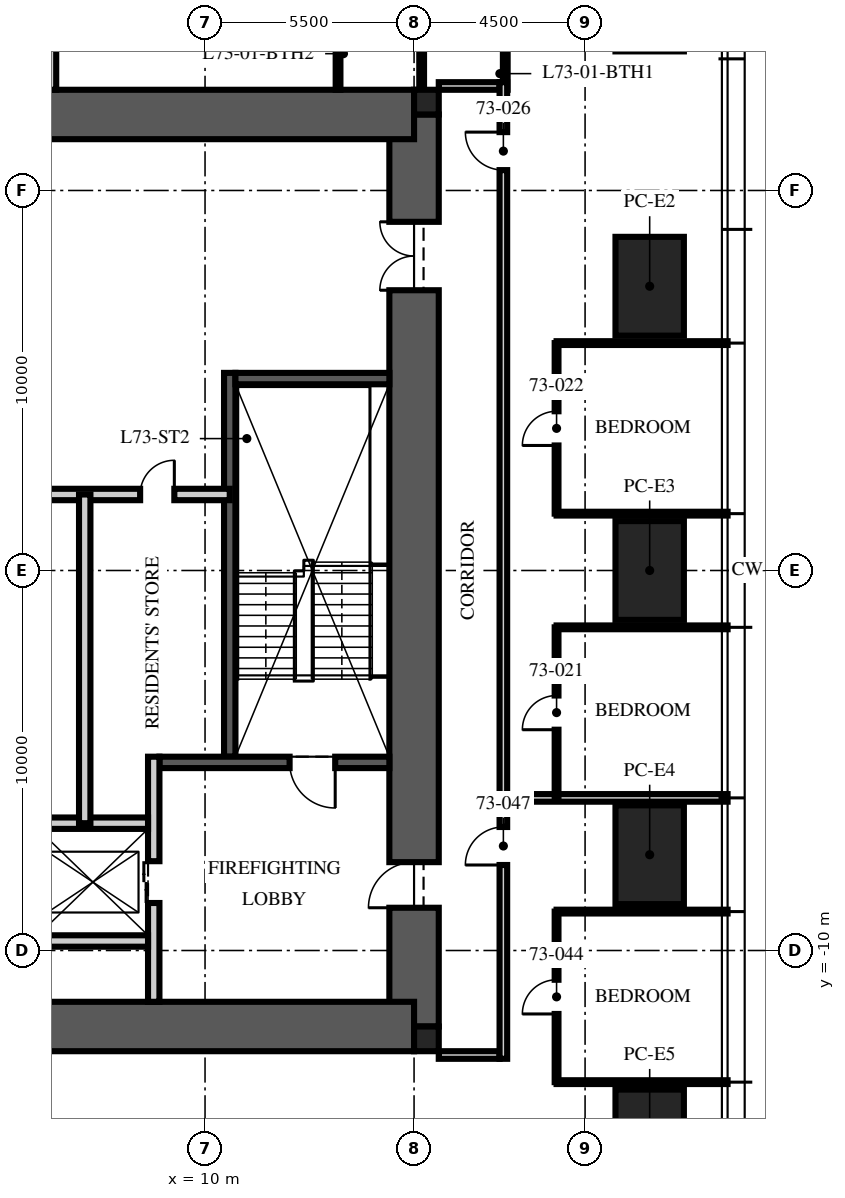
"""IFC4 building model, lengths in metres.
Left out: names, types, materials, properties, quantities, classifications, styles, units other than length and angle.
Written with IfcOpenShell. Run it as: python <this file> out.ifc"""

import sys

from ifc_helpers import new_model, si_unit, direction, frame, frame_2d, origin, origin_2d, place, context, subcontext, project, spatial, rectangle, extrude, element, fill, save


model = new_model("IFC4")
c1 = context("Model", 3, precision=1e-05, world=origin(), true_north=direction((0.0, 1.0)))
c2 = subcontext(c1, "Body", "Model", "MODEL_VIEW")
j1 = project(units=[si_unit("LENGTHUNIT", "METRE"), si_unit("PLANEANGLEUNIT", "RADIAN")], contexts=[c1])
p1 = place(None, origin())
s1 = spatial("IfcSite", under=j1, at=p1, CompositionType="ELEMENT")
p2 = place(p1, origin())
s2 = spatial("IfcBuilding", under=s1, at=p2, CompositionType="ELEMENT")
p3 = place(p2, frame((0.0, 0.0, 293.25)))
s3 = spatial("IfcBuildingStorey", under=s2, at=p3, CompositionType="ELEMENT", Elevation=293.25)
p4 = place(p3, frame((15.5, -12.0, -0.25), z_axis=(0.0, 0.0, 1.0), x_axis=(0.0, 1.0, 0.0)))
e1 = element("IfcWall", 1, at=p4, inside=s3, PredefinedType="SHEAR", context=c2, shape_type="SweptSolid", body=[
    extrude(rectangle(XDim=24.0, YDim=1.3, at=frame_2d((12.0, 0.0))), origin(), (0.0, 0.0, 1.0), 3.75),
])
p5 = place(p4, frame((3.125, 0.0, 0.25)))
e2 = element("IfcOpeningElement", 2, at=p5, cuts=e1, PredefinedType="OPENING", context=c2, shape_type="SweptSolid", body=[
    extrude(rectangle(XDim=1.2, YDim=2.1, at=frame_2d((0.6, 1.05))), frame((0.0, 0.66, 0.0), z_axis=(0.0, -1.0, 0.0), x_axis=(1.0, 0.0, 0.0)), (0.0, 0.0, 1.0), 1.32),
])
p6 = place(p4, frame((19.375, 0.0, 0.25)))
e3 = element("IfcOpeningElement", 3, at=p6, cuts=e1, PredefinedType="OPENING", context=c2, shape_type="SweptSolid", body=[
    extrude(rectangle(XDim=1.8, YDim=2.1, at=frame_2d((0.9, 1.05))), frame((0.0, 0.66, 0.0), z_axis=(0.0, -1.0, 0.0), x_axis=(1.0, 0.0, 0.0)), (0.0, 0.0, 1.0), 1.32),
])
for number, where, z_axis, x_axis in (
    (4, (-15.5, 12.0, -0.25), (0.0, 0.0, 1.0), (1.0, 0.0, 0.0)),
    (5, (-15.5, -12.0, -0.25), (0.0, 0.0, 1.0), (1.0, 0.0, 0.0)),
):
    element("IfcWall", number, at=place(p3, frame(where, z_axis=z_axis, x_axis=x_axis)), inside=s3, PredefinedType="SHEAR", context=c2, shape_type="SweptSolid", body=[
        extrude(rectangle(XDim=31.0, YDim=1.3, at=frame_2d((15.5, 0.0))), origin(), (0.0, 0.0, 1.0), 3.75),
    ])
for number, where, z_axis, x_axis in (
    (6, (15.825, 12.325, -0.25), (0.0, 0.0, 1.0), (1.0, 0.0, 0.0)),
    (7, (15.825, -12.325, -0.25), (0.0, 0.0, 1.0), (1.0, 0.0, 0.0)),
):
    element("IfcColumn", number, at=place(p3, frame(where, z_axis=z_axis, x_axis=x_axis)), inside=s3, PredefinedType="COLUMN", context=c2, shape_type="SweptSolid", body=[
        extrude(rectangle(XDim=0.65, YDim=0.65, at=origin_2d()), origin(), (0.0, 0.0, 1.0), 3.75),
    ])
for number, where, z_axis, x_axis in (
    (8, (21.7, 7.48, 0.0), (0.0, 0.0, 1.0), (0.0, 1.0, 0.0)),
    (9, (21.7, 0.0, 0.0), (0.0, 0.0, 1.0), (0.0, 1.0, 0.0)),
    (10, (21.7, -7.48, 0.0), (0.0, 0.0, 1.0), (0.0, 1.0, 0.0)),
    (11, (21.7, -14.96, 0.0), (0.0, 0.0, 1.0), (0.0, 1.0, 0.0)),
):
    element("IfcColumn", number, at=place(p3, frame(where, z_axis=z_axis, x_axis=x_axis)), inside=s3, PredefinedType="COLUMN", context=c2, shape_type="SweptSolid", body=[
        extrude(rectangle(XDim=2.6, YDim=1.8, at=origin_2d()), origin(), (0.0, 0.0, 1.0), 3.75),
    ])
p7 = place(p3, frame((10.65, -4.9, 0.0), z_axis=(0.0, 0.0, 1.0), x_axis=(0.0, 1.0, 0.0)))
e12 = element("IfcWall", 12, at=p7, inside=s3, PredefinedType="SOLIDWALL", context=c2, shape_type="SweptSolid", body=[
    extrude(rectangle(XDim=10.1, YDim=0.3, at=frame_2d((5.05, 0.0))), origin(), (0.0, 0.0, 1.0), 3.5),
])
p8 = place(p3, frame((14.85, -5.05, 0.0), z_axis=(0.0, 0.0, 1.0), x_axis=(-1.0, 0.0, 0.0)))
e13 = element("IfcWall", 13, at=p8, inside=s3, PredefinedType="SOLIDWALL", context=c2, shape_type="SweptSolid", body=[
    extrude(rectangle(XDim=6.05, YDim=0.3, at=frame_2d((3.025, 0.0))), origin(), (0.0, 0.0, 1.0), 3.5),
])
p9 = place(p8, frame((1.425, 0.0, 0.0)))
e14 = element("IfcOpeningElement", 14, at=p9, cuts=e13, PredefinedType="OPENING", context=c2, shape_type="SweptSolid", body=[
    extrude(rectangle(XDim=1.2, YDim=2.1, at=frame_2d((0.6, 1.05))), frame((0.0, 0.16, 0.0), z_axis=(0.0, -1.0, 0.0), x_axis=(1.0, 0.0, 0.0)), (0.0, 0.0, 1.0), 0.32),
])
p10 = place(p3, frame((14.85, 5.05, 0.0), z_axis=(0.0, 0.0, 1.0), x_axis=(-1.0, 0.0, 0.0)))
e15 = element("IfcWall", 15, at=p10, inside=s3, PredefinedType="SOLIDWALL", context=c2, shape_type="SweptSolid", body=[
    extrude(rectangle(XDim=4.05, YDim=0.3, at=frame_2d((2.025, 0.0))), origin(), (0.0, 0.0, 1.0), 3.5),
])
p11 = place(p3, frame((8.65, -11.35, 0.0), z_axis=(0.0, 0.0, 1.0), x_axis=(0.0, 1.0, 0.0)))
e16 = element("IfcWall", 16, at=p11, inside=s3, PredefinedType="PARTITIONING", context=c2, shape_type="SweptSolid", body=[
    extrude(rectangle(XDim=6.45, YDim=0.3, at=frame_2d((3.225, 0.0))), origin(), (0.0, 0.0, 1.0), 3.5),
])
p12 = place(p11, frame((2.6, 0.0, 0.0)))
e17 = element("IfcOpeningElement", 17, at=p12, cuts=e16, PredefinedType="OPENING", context=c2, shape_type="SweptSolid", body=[
    extrude(rectangle(XDim=1.1, YDim=2.1, at=frame_2d((0.55, 1.05))), frame((0.0, 0.16, 0.0), z_axis=(0.0, -1.0, 0.0), x_axis=(1.0, 0.0, 0.0)), (0.0, 0.0, 1.0), 0.32),
])
p13 = place(p3, frame((-8.5, -6.65, 0.0), z_axis=(0.0, 0.0, 1.0), x_axis=(1.0, 0.0, 0.0)))
e18 = element("IfcWall", 18, at=p13, inside=s3, PredefinedType="PARTITIONING", context=c2, shape_type="SweptSolid", body=[
    extrude(rectangle(XDim=17.0, YDim=0.3, at=frame_2d((8.5, 0.0))), origin(), (0.0, 0.0, 1.0), 3.5),
])
p14 = place(p13, frame((7.8, 0.0, 0.0)))
e19 = element("IfcOpeningElement", 19, at=p14, cuts=e18, PredefinedType="OPENING", context=c2, shape_type="SweptSolid", body=[
    extrude(rectangle(XDim=1.3, YDim=2.4, at=frame_2d((0.65, 1.2))), frame((0.0, 0.16, 0.0), z_axis=(0.0, -1.0, 0.0), x_axis=(1.0, 0.0, 0.0)), (0.0, 0.0, 1.0), 0.32),
])
p15 = place(p13, frame((5.65, 0.0, 0.0)))
e20 = element("IfcOpeningElement", 20, at=p15, cuts=e18, PredefinedType="OPENING", context=c2, shape_type="SweptSolid", body=[
    extrude(rectangle(XDim=0.9, YDim=2.1, at=frame_2d((0.45, 1.05))), frame((0.0, 0.16, 0.0), z_axis=(0.0, -1.0, 0.0), x_axis=(1.0, 0.0, 0.0)), (0.0, 0.0, 1.0), 0.32),
])
p16 = place(p13, frame((10.4, 0.0, 0.0)))
e21 = element("IfcOpeningElement", 21, at=p16, cuts=e18, PredefinedType="OPENING", context=c2, shape_type="SweptSolid", body=[
    extrude(rectangle(XDim=0.9, YDim=2.1, at=frame_2d((0.45, 1.05))), frame((0.0, 0.16, 0.0), z_axis=(0.0, -1.0, 0.0), x_axis=(1.0, 0.0, 0.0)), (0.0, 0.0, 1.0), 0.32),
])
p17 = place(p3, frame((5.6, -9.75, 0.0), z_axis=(0.0, 0.0, 1.0), x_axis=(1.0, 0.0, 0.0)))
e22 = element("IfcWall", 22, at=p17, inside=s3, PredefinedType="PARTITIONING", context=c2, shape_type="SweptSolid", body=[
    extrude(rectangle(XDim=2.9, YDim=0.3, at=frame_2d((1.45, 0.0))), origin(), (0.0, 0.0, 1.0), 3.5),
])
p18 = place(p3, frame((-10.65, 2.0, 0.0), z_axis=(0.0, 0.0, 1.0), x_axis=(1.0, 0.0, 0.0)))
e23 = element("IfcWall", 23, at=p18, inside=s3, PredefinedType="PARTITIONING", context=c2, shape_type="SweptSolid", body=[
    extrude(rectangle(XDim=21.3, YDim=0.3, at=frame_2d((10.65, 0.0))), origin(), (0.0, 0.0, 1.0), 3.5),
])
p19 = place(p18, frame((10.05, 0.0, 0.0)))
e24 = element("IfcOpeningElement", 24, at=p19, cuts=e23, PredefinedType="OPENING", context=c2, shape_type="SweptSolid", body=[
    extrude(rectangle(XDim=1.2, YDim=2.1, at=frame_2d((0.6, 1.05))), frame((0.0, 0.16, 0.0), z_axis=(0.0, -1.0, 0.0), x_axis=(1.0, 0.0, 0.0)), (0.0, 0.0, 1.0), 0.32),
])
p20 = place(p18, frame((18.942, 0.0, 0.0)))
e25 = element("IfcOpeningElement", 25, at=p20, cuts=e23, PredefinedType="OPENING", context=c2, shape_type="SweptSolid", body=[
    extrude(rectangle(XDim=0.9, YDim=2.1, at=frame_2d((0.45, 1.05))), frame((0.0, 0.16, 0.0), z_axis=(0.0, -1.0, 0.0), x_axis=(1.0, 0.0, 0.0)), (0.0, 0.0, 1.0), 0.32),
])
p21 = place(p3, frame((6.834, -6.65, 0.0), z_axis=(0.0, 0.0, 1.0), x_axis=(0.0, 1.0, 0.0)))
e26 = element("IfcWall", 26, at=p21, inside=s3, PredefinedType="PARTITIONING", context=c2, shape_type="SweptSolid", body=[
    extrude(rectangle(XDim=8.65, YDim=0.3, at=frame_2d((4.325, 0.0))), origin(), (0.0, 0.0, 1.0), 3.5),
])
for number, where, z_axis, x_axis in (
    (27, (16.15, 12.75, 0.0), (0.0, 0.0, 1.0), (1.0, 0.0, 0.0)),
    (28, (16.15, -12.75, 0.0), (0.0, 0.0, 1.0), (1.0, 0.0, 0.0)),
):
    element("IfcWall", number, at=place(p3, frame(where, z_axis=z_axis, x_axis=x_axis)), inside=s3, PredefinedType="PARTITIONING", context=c2, shape_type="SweptSolid", body=[
        extrude(rectangle(XDim=1.6, YDim=0.2, at=frame_2d((0.8, 0.0))), origin(), (0.0, 0.0, 1.0), 2.6),
    ])
p22 = place(p3, frame((17.95, -5.984, 0.0), z_axis=(0.0, 0.0, 1.0), x_axis=(1.0, 0.0, 0.0)))
e29 = element("IfcWall", 29, at=p22, inside=s3, PredefinedType="PARTITIONING", context=c2, shape_type="SweptSolid", body=[
    extrude(rectangle(XDim=5.8, YDim=0.2, at=frame_2d((2.9, 0.0))), origin(), (0.0, 0.0, 1.0), 3.01),
])
for number, where, z_axis, x_axis in (
    (30, (19.25, -1.496, 0.0), (0.0, 0.0, 1.0), (1.0, 0.0, 0.0)),
    (31, (19.25, 1.496, 0.0), (0.0, 0.0, 1.0), (1.0, 0.0, 0.0)),
    (32, (19.25, 5.984, 0.0), (0.0, 0.0, 1.0), (1.0, 0.0, 0.0)),
):
    element("IfcWall", number, at=place(p3, frame(where, z_axis=z_axis, x_axis=x_axis)), inside=s3, PredefinedType="PARTITIONING", context=c2, shape_type="SweptSolid", body=[
        extrude(rectangle(XDim=4.5, YDim=0.1, at=frame_2d((2.25, 0.0))), origin(), (0.0, 0.0, 1.0), 3.01),
    ])
p23 = place(p3, frame((5.984, 12.65, 0.0), z_axis=(0.0, 0.0, 1.0), x_axis=(0.0, 1.0, 0.0)))
e33 = element("IfcWall", 33, at=p23, inside=s3, PredefinedType="PARTITIONING", context=c2, shape_type="SweptSolid", body=[
    extrude(rectangle(XDim=11.1, YDim=0.2, at=frame_2d((5.55, 0.0))), origin(), (0.0, 0.0, 1.0), 3.01),
])
for number, where, z_axis, x_axis in (
    (34, (19.25, -13.464, 0.0), (0.0, 0.0, 1.0), (1.0, 0.0, 0.0)),
    (35, (19.25, -8.976, 0.0), (0.0, 0.0, 1.0), (1.0, 0.0, 0.0)),
):
    element("IfcWall", number, at=place(p3, frame(where, z_axis=z_axis, x_axis=x_axis)), inside=s3, PredefinedType="PARTITIONING", context=c2, shape_type="SweptSolid", body=[
        extrude(rectangle(XDim=4.5, YDim=0.1, at=frame_2d((2.25, 0.0))), origin(), (0.0, 0.0, 1.0), 3.01),
    ])
p24 = place(p3, frame((19.25, -5.984, 0.0), z_axis=(0.0, 0.0, 1.0), x_axis=(0.0, 1.0, 0.0)))
e36 = element("IfcWall", 36, at=p24, inside=s3, PredefinedType="PARTITIONING", context=c2, shape_type="SweptSolid", body=[
    extrude(rectangle(XDim=4.488, YDim=0.1, at=frame_2d((2.244, 0.0))), origin(), (0.0, 0.0, 1.0), 2.91),
])
p25 = place(p24, frame((1.794, 0.0, 0.0)))
e37 = element("IfcOpeningElement", 37, at=p25, cuts=e36, PredefinedType="OPENING", context=c2, shape_type="SweptSolid", body=[
    extrude(rectangle(XDim=0.9, YDim=2.1, at=frame_2d((0.45, 1.05))), frame((0.0, 0.06, 0.0), z_axis=(0.0, -1.0, 0.0), x_axis=(1.0, 0.0, 0.0)), (0.0, 0.0, 1.0), 0.12),
])
p26 = place(p3, frame((19.25, 1.496, 0.0), z_axis=(0.0, 0.0, 1.0), x_axis=(0.0, 1.0, 0.0)))
e38 = element("IfcWall", 38, at=p26, inside=s3, PredefinedType="PARTITIONING", context=c2, shape_type="SweptSolid", body=[
    extrude(rectangle(XDim=4.488, YDim=0.1, at=frame_2d((2.244, 0.0))), origin(), (0.0, 0.0, 1.0), 2.91),
])
p27 = place(p26, frame((1.794, 0.0, 0.0)))
e39 = element("IfcOpeningElement", 39, at=p27, cuts=e38, PredefinedType="OPENING", context=c2, shape_type="SweptSolid", body=[
    extrude(rectangle(XDim=0.9, YDim=2.1, at=frame_2d((0.45, 1.05))), frame((0.0, 0.06, 0.0), z_axis=(0.0, -1.0, 0.0), x_axis=(1.0, 0.0, 0.0)), (0.0, 0.0, 1.0), 0.12),
])
p28 = place(p3, frame((17.9, 12.65, 0.0), z_axis=(0.0, 0.0, 1.0), x_axis=(0.0, 1.0, 0.0)))
e40 = element("IfcWall", 40, at=p28, inside=s3, PredefinedType="PARTITIONING", context=c2, shape_type="SweptSolid", body=[
    extrude(rectangle(XDim=2.8, YDim=0.125, at=frame_2d((1.4, 0.0))), origin(), (0.0, 0.0, 1.0), 2.9),
])
p29 = place(p3, frame((15.7, 12.65, 0.0), z_axis=(0.0, 0.0, 1.0), x_axis=(0.0, 1.0, 0.0)))
e41 = element("IfcWall", 41, at=p29, inside=s3, PredefinedType="PARTITIONING", context=c2, shape_type="SweptSolid", body=[
    extrude(rectangle(XDim=2.8, YDim=0.125, at=frame_2d((1.4, 0.0))), origin(), (0.0, 0.0, 1.0), 2.6),
])
p30 = place(p3, frame((13.5, 12.65, 0.0), z_axis=(0.0, 0.0, 1.0), x_axis=(0.0, 1.0, 0.0)))
e42 = element("IfcWall", 42, at=p30, inside=s3, PredefinedType="PARTITIONING", context=c2, shape_type="SweptSolid", body=[
    extrude(rectangle(XDim=2.8, YDim=0.125, at=frame_2d((1.4, 0.0))), origin(), (0.0, 0.0, 1.0), 3.5),
])
p31 = place(p3, frame((19.25, -13.464, 0.0), z_axis=(0.0, 0.0, 1.0), x_axis=(0.0, 1.0, 0.0)))
e43 = element("IfcWall", 43, at=p31, inside=s3, PredefinedType="PARTITIONING", context=c2, shape_type="SweptSolid", body=[
    extrude(rectangle(XDim=4.488, YDim=0.1, at=frame_2d((2.244, 0.0))), origin(), (0.0, 0.0, 1.0), 2.91),
])
p32 = place(p31, frame((1.794, 0.0, 0.0)))
e44 = element("IfcOpeningElement", 44, at=p32, cuts=e43, PredefinedType="OPENING", context=c2, shape_type="SweptSolid", body=[
    extrude(rectangle(XDim=0.9, YDim=2.1, at=frame_2d((0.45, 1.05))), frame((0.0, 0.06, 0.0), z_axis=(0.0, -1.0, 0.0), x_axis=(1.0, 0.0, 0.0)), (0.0, 0.0, 1.0), 0.12),
])
p33 = place(p3, frame((17.85, -12.85, 0.0), z_axis=(0.0, 0.0, 1.0), x_axis=(0.0, 1.0, 0.0)))
e45 = element("IfcWall", 45, at=p33, inside=s3, PredefinedType="PARTITIONING", context=c2, shape_type="SweptSolid", body=[
    extrude(rectangle(XDim=25.7, YDim=0.2, at=frame_2d((12.85, 0.0))), origin(), (0.0, 0.0, 1.0), 2.9),
])
p34 = place(p33, frame((23.386, 0.0, 0.0)))
e46 = element("IfcOpeningElement", 46, at=p34, cuts=e45, PredefinedType="OPENING", context=c2, shape_type="SweptSolid", body=[
    extrude(rectangle(XDim=1.0, YDim=2.2, at=frame_2d((0.5, 1.1))), frame((0.0, 0.11, 0.0), z_axis=(0.0, -1.0, 0.0), x_axis=(1.0, 0.0, 0.0)), (0.0, 0.0, 1.0), 0.22),
])
p35 = place(p33, frame((5.1, 0.0, 0.0)))
e47 = element("IfcOpeningElement", 47, at=p35, cuts=e45, PredefinedType="OPENING", context=c2, shape_type="SweptSolid", body=[
    extrude(rectangle(XDim=1.0, YDim=2.2, at=frame_2d((0.5, 1.1))), frame((0.0, 0.11, 0.0), z_axis=(0.0, -1.0, 0.0), x_axis=(1.0, 0.0, 0.0)), (0.0, 0.0, 1.0), 0.22),
])
p36 = place(p9, origin())
e48 = element("IfcDoor", 48, at=p36, inside=s3, OperationType="SINGLE_SWING_LEFT", PredefinedType="DOOR", context=c2, shape_type="SweptSolid", body=[
    extrude(rectangle(XDim=1.2, YDim=2.1, at=frame_2d((0.6, 1.05))), frame((0.0, 0.025, 0.0), z_axis=(0.0, -1.0, 0.0), x_axis=(1.0, 0.0, 0.0)), (0.0, 0.0, 1.0), 0.05),
])
fill(e14, e48)
p37 = place(p5, origin())
e49 = element("IfcDoor", 49, at=p37, inside=s3, OperationType="SINGLE_SWING_LEFT", PredefinedType="DOOR", context=c2, shape_type="SweptSolid", body=[
    extrude(rectangle(XDim=1.2, YDim=2.1, at=frame_2d((0.6, 1.05))), frame((0.0, 0.025, 0.0), z_axis=(0.0, -1.0, 0.0), x_axis=(1.0, 0.0, 0.0)), (0.0, 0.0, 1.0), 0.05),
])
fill(e2, e49)
p38 = place(p6, origin())
e50 = element("IfcDoor", 50, at=p38, inside=s3, OperationType="DOUBLE_DOOR_SINGLE_SWING", PredefinedType="DOOR", context=c2, shape_type="SweptSolid", body=[
    extrude(rectangle(XDim=1.8, YDim=2.1, at=frame_2d((0.9, 1.05))), frame((0.0, 0.025, 0.0), z_axis=(0.0, -1.0, 0.0), x_axis=(1.0, 0.0, 0.0)), (0.0, 0.0, 1.0), 0.05),
])
fill(e3, e50)
p39 = place(p12, origin())
e51 = element("IfcDoor", 51, at=p39, inside=s3, OperationType="DOUBLE_DOOR_SLIDING", PredefinedType="DOOR", context=c2, shape_type="SweptSolid", body=[
    extrude(rectangle(XDim=1.1, YDim=2.1, at=frame_2d((0.55, 1.05))), frame((0.0, 0.025, 0.0), z_axis=(0.0, -1.0, 0.0), x_axis=(1.0, 0.0, 0.0)), (0.0, 0.0, 1.0), 0.05),
])
fill(e17, e51)
p40 = place(p20, origin())
e52 = element("IfcDoor", 52, at=p40, inside=s3, OperationType="SINGLE_SWING_RIGHT", PredefinedType="DOOR", context=c2, shape_type="SweptSolid", body=[
    extrude(rectangle(XDim=0.9, YDim=2.1, at=frame_2d((0.45, 1.05))), frame((0.0, 0.025, 0.0), z_axis=(0.0, -1.0, 0.0), x_axis=(1.0, 0.0, 0.0)), (0.0, 0.0, 1.0), 0.05),
])
fill(e25, e52)
p41 = place(p25, origin())
e53 = element("IfcDoor", 53, at=p41, inside=s3, OperationType="SINGLE_SWING_LEFT", PredefinedType="DOOR", context=c2, shape_type="SweptSolid", body=[
    extrude(rectangle(XDim=0.9, YDim=2.1, at=frame_2d((0.45, 1.05))), frame((0.0, 0.025, 0.0), z_axis=(0.0, -1.0, 0.0), x_axis=(1.0, 0.0, 0.0)), (0.0, 0.0, 1.0), 0.05),
])
fill(e37, e53)
p42 = place(p27, origin())
e54 = element("IfcDoor", 54, at=p42, inside=s3, OperationType="SINGLE_SWING_LEFT", PredefinedType="DOOR", context=c2, shape_type="SweptSolid", body=[
    extrude(rectangle(XDim=0.9, YDim=2.1, at=frame_2d((0.45, 1.05))), frame((0.0, 0.025, 0.0), z_axis=(0.0, -1.0, 0.0), x_axis=(1.0, 0.0, 0.0)), (0.0, 0.0, 1.0), 0.05),
])
fill(e39, e54)
p43 = place(p34, origin())
e55 = element("IfcDoor", 55, at=p43, inside=s3, OperationType="SINGLE_SWING_RIGHT", PredefinedType="DOOR", context=c2, shape_type="SweptSolid", body=[
    extrude(rectangle(XDim=1.0, YDim=2.2, at=frame_2d((0.5, 1.1))), frame((0.0, 0.025, 0.0), z_axis=(0.0, -1.0, 0.0), x_axis=(1.0, 0.0, 0.0)), (0.0, 0.0, 1.0), 0.05),
])
fill(e46, e55)
p44 = place(p32, origin())
e56 = element("IfcDoor", 56, at=p44, inside=s3, OperationType="SINGLE_SWING_LEFT", PredefinedType="DOOR", context=c2, shape_type="SweptSolid", body=[
    extrude(rectangle(XDim=0.9, YDim=2.1, at=frame_2d((0.45, 1.05))), frame((0.0, 0.025, 0.0), z_axis=(0.0, -1.0, 0.0), x_axis=(1.0, 0.0, 0.0)), (0.0, 0.0, 1.0), 0.05),
])
fill(e44, e56)
p45 = place(p35, origin())
e57 = element("IfcDoor", 57, at=p45, inside=s3, OperationType="SINGLE_SWING_LEFT", PredefinedType="DOOR", context=c2, shape_type="SweptSolid", body=[
    extrude(rectangle(XDim=1.0, YDim=2.2, at=frame_2d((0.5, 1.1))), frame((0.0, 0.025, 0.0), z_axis=(0.0, -1.0, 0.0), x_axis=(1.0, 0.0, 0.0)), (0.0, 0.0, 1.0), 0.05),
])
fill(e47, e57)
save(model, sys.argv[1])
